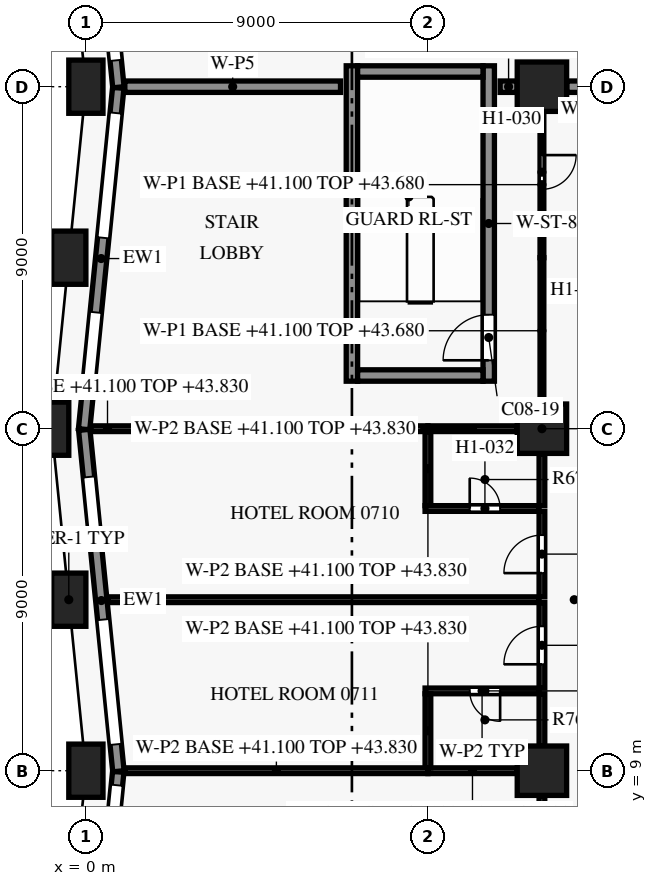
"""IFC4 building model, lengths in metres.
Left out: names, types, materials, properties, quantities, classifications, styles, units other than length and angle.
Written with IfcOpenShell. Run it as: python <this file> out.ifc"""

import sys

from ifc_helpers import new_model, si_unit, direction, frame, frame_2d, origin, origin_2d, place, context, subcontext, project, spatial, rectangle, extrude, element, fill, save


model = new_model("IFC4")
c1 = context("Model", 3, precision=1e-05, world=origin(), true_north=direction((0.0, 1.0)))
c2 = subcontext(c1, "Body", "Model", "MODEL_VIEW")
j1 = project(units=[si_unit("LENGTHUNIT", "METRE"), si_unit("PLANEANGLEUNIT", "RADIAN")], contexts=[c1])
p1 = place(None, origin())
s1 = spatial("IfcSite", under=j1, at=p1, CompositionType="ELEMENT")
p2 = place(p1, origin())
s2 = spatial("IfcBuilding", under=s1, at=p2, CompositionType="ELEMENT")
p3 = place(p2, frame((0.0, 0.0, 41.1)))
s3 = spatial("IfcBuildingStorey", under=s2, at=p3, CompositionType="ELEMENT", Elevation=41.1)
for number, where, z_axis, x_axis in (
    (1, (0.0, 27.0, 0.0), (0.0, 0.0, 1.0), (0.0, -1.0, 0.0)),
    (2, (-0.45, 22.5, 0.0), (0.0, 0.0, 1.0), (-0.1, -0.995, 0.0)),
    (3, (-0.9, 18.0, 0.0), (0.0, 0.0, 1.0), (0.0, -1.0, 0.0)),
    (4, (-0.45, 13.5, 0.0), (0.0, 0.0, 1.0), (0.1, -0.995, 0.0)),
    (5, (0.0, 9.0, 0.0), (0.0, 0.0, 1.0), (0.0, -1.0, 0.0)),
):
    element("IfcColumn", number, at=place(p3, frame(where, z_axis=z_axis, x_axis=x_axis)), inside=s3, PredefinedType="COLUMN", context=c2, shape_type="SweptSolid", body=[
        extrude(rectangle(XDim=0.9, YDim=1.4, at=origin_2d()), origin(), (0.0, 0.0, 1.0), 3.6),
    ])
for number, where, z_axis, x_axis in (
    (6, (12.0, 9.0, 0.0), (0.0, 0.0, 1.0), (1.0, 0.0, 0.0)),
    (7, (12.0, 18.0, 0.0), (0.0, 0.0, 1.0), (1.0, 0.0, 0.0)),
    (8, (12.0, 27.0, 0.0), (0.0, 0.0, 1.0), (1.0, 0.0, 0.0)),
):
    element("IfcColumn", number, at=place(p3, frame(where, z_axis=z_axis, x_axis=x_axis)), inside=s3, PredefinedType="COLUMN", context=c2, shape_type="SweptSolid", body=[
        extrude(rectangle(XDim=1.3, YDim=1.3, at=origin_2d()), origin(), (0.0, 0.0, 1.0), 3.6),
    ])
p4 = place(p3, frame((0.856, 26.985, 0.0), z_axis=(0.0, 0.0, 1.0), x_axis=(-0.099503719021, 0.99503719021, 0.0)))
e9 = element("IfcWall", 9, at=p4, inside=s3, PredefinedType="SOLIDWALL", context=c2, shape_type="SweptSolid", body=[
    extrude(rectangle(XDim=8.995, YDim=0.3, at=frame_2d((4.498, 0.0))), origin(), (0.0, 0.0, 1.0), 2.95),
])
p5 = place(p4, frame((0.711, 0.0, 0.15)))
e10 = element("IfcOpeningElement", 10, at=p5, cuts=e9, PredefinedType="OPENING", context=c2, shape_type="SweptSolid", body=[
    extrude(rectangle(XDim=3.3, YDim=2.4, at=frame_2d((1.65, 1.2))), frame((0.0, 0.16, 0.0), z_axis=(0.0, -1.0, 0.0), x_axis=(1.0, 0.0, 0.0)), (0.0, 0.0, 1.0), 0.32),
])
p6 = place(p4, frame((5.984, 0.0, 0.75)))
e11 = element("IfcOpeningElement", 11, at=p6, cuts=e9, PredefinedType="OPENING", context=c2, shape_type="SweptSolid", body=[
    extrude(rectangle(XDim=1.8, YDim=1.8, at=frame_2d((0.9, 0.9))), frame((0.0, 0.16, 0.0), z_axis=(0.0, -1.0, 0.0), x_axis=(1.0, 0.0, 0.0)), (0.0, 0.0, 1.0), 0.32),
])
p7 = place(p3, frame((-0.047, 17.985, 0.0), z_axis=(0.0, 0.0, 1.0), x_axis=(0.099522457379, 0.995035316196, 0.0)))
e12 = element("IfcWall", 12, at=p7, inside=s3, PredefinedType="SOLIDWALL", context=c2, shape_type="SweptSolid", body=[
    extrude(rectangle(XDim=9.03, YDim=0.3, at=frame_2d((4.515, 0.0))), origin(), (0.0, 0.0, 1.0), 2.95),
])
p8 = place(p7, frame((1.291, 0.0, 0.75)))
e13 = element("IfcOpeningElement", 13, at=p8, cuts=e12, PredefinedType="OPENING", context=c2, shape_type="SweptSolid", body=[
    extrude(rectangle(XDim=1.8, YDim=1.8, at=frame_2d((0.9, 0.9))), frame((0.0, 0.16, 0.0), z_axis=(0.0, -1.0, 0.0), x_axis=(1.0, 0.0, 0.0)), (0.0, 0.0, 1.0), 0.32),
])
p9 = place(p7, frame((5.064, 0.0, 0.15)))
e14 = element("IfcOpeningElement", 14, at=p9, cuts=e12, PredefinedType="OPENING", context=c2, shape_type="SweptSolid", body=[
    extrude(rectangle(XDim=3.3, YDim=2.4, at=frame_2d((1.65, 1.2))), frame((0.0, 0.16, 0.0), z_axis=(0.0, -1.0, 0.0), x_axis=(1.0, 0.0, 0.0)), (0.0, 0.0, 1.0), 0.32),
])
p10 = place(p3, frame((0.856, 8.985, 0.0), z_axis=(0.0, 0.0, 1.0), x_axis=(-0.099495688264, 0.995037993253, 0.0)))
e15 = element("IfcWall", 15, at=p10, inside=s3, PredefinedType="SOLIDWALL", context=c2, shape_type="SweptSolid", body=[
    extrude(rectangle(XDim=9.03, YDim=0.3, at=frame_2d((4.515, 0.0))), origin(), (0.0, 0.0, 1.0), 2.95),
])
p11 = place(p10, frame((0.711, 0.0, 0.15)))
e16 = element("IfcOpeningElement", 16, at=p11, cuts=e15, PredefinedType="OPENING", context=c2, shape_type="SweptSolid", body=[
    extrude(rectangle(XDim=3.3, YDim=2.4, at=frame_2d((1.65, 1.2))), frame((0.0, 0.16, 0.0), z_axis=(0.0, -1.0, 0.0), x_axis=(1.0, 0.0, 0.0)), (0.0, 0.0, 1.0), 0.32),
])
p12 = place(p10, frame((5.984, 0.0, 0.75)))
e17 = element("IfcOpeningElement", 17, at=p12, cuts=e15, PredefinedType="OPENING", context=c2, shape_type="SweptSolid", body=[
    extrude(rectangle(XDim=1.8, YDim=1.8, at=frame_2d((0.9, 0.9))), frame((0.0, 0.16, 0.0), z_axis=(0.0, -1.0, 0.0), x_axis=(1.0, 0.0, 0.0)), (0.0, 0.0, 1.0), 0.32),
])
p13 = place(p3, frame((0.473, 5.185, 0.0), z_axis=(0.0, 0.0, 1.0), x_axis=(0.099541845169, 0.995033376857, 0.0)))
e18 = element("IfcWall", 18, at=p13, inside=s3, PredefinedType="SOLIDWALL", context=c2, shape_type="SweptSolid", body=[
    extrude(rectangle(XDim=3.804, YDim=0.3, at=frame_2d((1.902, 0.0))), origin(), (0.0, 0.0, 1.0), 2.95),
])
p14 = place(p13, frame((0.15, 0.0, 0.15)))
e19 = element("IfcOpeningElement", 19, at=p14, cuts=e18, PredefinedType="OPENING", context=c2, shape_type="SweptSolid", body=[
    extrude(rectangle(XDim=3.3, YDim=2.4, at=frame_2d((1.65, 1.2))), frame((0.0, 0.16, 0.0), z_axis=(0.0, -1.0, 0.0), x_axis=(1.0, 0.0, 0.0)), (0.0, 0.0, 1.0), 0.32),
])
for number, where, z_axis, x_axis in (
    (20, (7.15, 19.4, 0.0), (0.0, 0.0, 1.0), (1.0, 0.0, 0.0)),
    (21, (7.15, 27.4, 0.0), (0.0, 0.0, 1.0), (1.0, 0.0, 0.0)),
):
    element("IfcWall", number, at=place(p3, frame(where, z_axis=z_axis, x_axis=x_axis)), inside=s3, PredefinedType="SHEAR", context=c2, shape_type="SweptSolid", body=[
        extrude(rectangle(XDim=3.3, YDim=0.3, at=frame_2d((1.65, 0.0))), origin(), (0.0, 0.0, 1.0), 3.3),
    ])
p15 = place(p3, frame((7.0, 19.25, 0.0), z_axis=(0.0, 0.0, 1.0), x_axis=(0.0, 1.0, 0.0)))
e22 = element("IfcWall", 22, at=p15, inside=s3, PredefinedType="SHEAR", context=c2, shape_type="SweptSolid", body=[
    extrude(rectangle(XDim=8.3, YDim=0.3, at=frame_2d((4.15, 0.0))), origin(), (0.0, 0.0, 1.0), 3.3),
])
p16 = place(p3, frame((10.6, 19.25, 0.0), z_axis=(0.0, 0.0, 1.0), x_axis=(0.0, 1.0, 0.0)))
e23 = element("IfcWall", 23, at=p16, inside=s3, PredefinedType="SHEAR", context=c2, shape_type="SweptSolid", body=[
    extrude(rectangle(XDim=8.3, YDim=0.3, at=frame_2d((4.15, 0.0))), origin(), (0.0, 0.0, 1.0), 3.3),
])
p17 = place(p16, frame((0.55, 0.0, 0.0)))
e24 = element("IfcOpeningElement", 24, at=p17, cuts=e23, PredefinedType="OPENING", context=c2, shape_type="SweptSolid", body=[
    extrude(rectangle(XDim=1.2, YDim=2.2, at=frame_2d((0.6, 1.1))), frame((0.0, 0.16, 0.0), z_axis=(0.0, -1.0, 0.0), x_axis=(1.0, 0.0, 0.0)), (0.0, 0.0, 1.0), 0.32),
])
p18 = place(p3, frame((12.0, 7.275, 0.0), z_axis=(0.0, 0.0, 1.0), x_axis=(0.0, 1.0, 0.0)))
e25 = element("IfcWall", 25, at=p18, inside=s3, PredefinedType="PARTITIONING", context=c2, shape_type="SweptSolid", body=[
    extrude(rectangle(XDim=1.07, YDim=0.15, at=frame_2d((0.535, 0.0))), origin(), (0.0, 0.0, 1.0), 2.58),
])
p19 = place(p3, frame((9.0, 9.0, 0.0), z_axis=(0.0, 0.0, 1.0), x_axis=(-1.0, 0.0, 0.0)))
e26 = element("IfcWall", 26, at=p19, inside=s3, PredefinedType="PARTITIONING", context=c2, shape_type="SweptSolid", body=[
    extrude(rectangle(XDim=7.975, YDim=0.15, at=frame_2d((3.988, 0.0))), origin(), (0.0, 0.0, 1.0), 2.73),
])
p20 = place(p3, frame((11.345, 9.0, 0.0), z_axis=(0.0, 0.0, 1.0), x_axis=(-1.0, 0.0, 0.0)))
e27 = element("IfcWall", 27, at=p20, inside=s3, PredefinedType="PARTITIONING", context=c2, shape_type="SweptSolid", body=[
    extrude(rectangle(XDim=2.345, YDim=0.15, at=frame_2d((1.172, 0.0))), origin(), (0.0, 0.0, 1.0), 2.73),
])
p21 = place(p3, frame((12.0, 9.655, 0.0), z_axis=(0.0, 0.0, 1.0), x_axis=(0.0, 1.0, 0.0)))
e28 = element("IfcWall", 28, at=p21, inside=s3, PredefinedType="PARTITIONING", context=c2, shape_type="SweptSolid", body=[
    extrude(rectangle(XDim=1.37, YDim=0.15, at=frame_2d((0.685, 0.0))), origin(), (0.0, 0.0, 1.0), 2.58),
])
p22 = place(p3, frame((9.0, 11.025, 0.0), z_axis=(0.0, 0.0, 1.0), x_axis=(0.0, -1.0, 0.0)))
e29 = element("IfcWall", 29, at=p22, inside=s3, PredefinedType="PARTITIONING", context=c2, shape_type="SweptSolid", body=[
    extrude(rectangle(XDim=1.95, YDim=0.15, at=frame_2d((0.975, 0.0))), origin(), (0.0, 0.0, 1.0), 2.73),
])
p23 = place(p3, frame((11.925, 11.1, 0.0), z_axis=(0.0, 0.0, 1.0), x_axis=(-1.0, 0.0, 0.0)))
e30 = element("IfcWall", 30, at=p23, inside=s3, PredefinedType="PARTITIONING", context=c2, shape_type="SweptSolid", body=[
    extrude(rectangle(XDim=3.0, YDim=0.15, at=frame_2d((1.5, 0.0))), origin(), (0.0, 0.0, 1.0), 2.58),
])
p24 = place(p23, frame((1.025, 0.0, 0.0)))
e31 = element("IfcOpeningElement", 31, at=p24, cuts=e30, PredefinedType="OPENING", context=c2, shape_type="SweptSolid", body=[
    extrude(rectangle(XDim=0.8, YDim=2.1, at=frame_2d((0.4, 1.05))), frame((0.0, 0.085, 0.0), z_axis=(0.0, -1.0, 0.0), x_axis=(1.0, 0.0, 0.0)), (0.0, 0.0, 1.0), 0.17),
])
p25 = place(p3, frame((12.0, 11.175, 0.0), z_axis=(0.0, 0.0, 1.0), x_axis=(0.0, 1.0, 0.0)))
e32 = element("IfcWall", 32, at=p25, inside=s3, PredefinedType="PARTITIONING", context=c2, shape_type="SweptSolid", body=[
    extrude(rectangle(XDim=2.25, YDim=0.15, at=frame_2d((1.125, 0.0))), origin(), (0.0, 0.0, 1.0), 2.58),
])
p26 = place(p25, frame((0.625, 0.0, 0.0)))
e33 = element("IfcOpeningElement", 33, at=p26, cuts=e32, PredefinedType="OPENING", context=c2, shape_type="SweptSolid", body=[
    extrude(rectangle(XDim=1.0, YDim=2.1, at=frame_2d((0.5, 1.05))), frame((0.0, 0.085, 0.0), z_axis=(0.0, -1.0, 0.0), x_axis=(1.0, 0.0, 0.0)), (0.0, 0.0, 1.0), 0.17),
])
p27 = place(p3, frame((11.925, 13.5, 0.0), z_axis=(0.0, 0.0, 1.0), x_axis=(-1.0, 0.0, 0.0)))
e34 = element("IfcWall", 34, at=p27, inside=s3, PredefinedType="PARTITIONING", context=c2, shape_type="SweptSolid", body=[
    extrude(rectangle(XDim=11.35, YDim=0.15, at=frame_2d((5.675, 0.0))), origin(), (0.0, 0.0, 1.0), 2.58),
])
p28 = place(p3, frame((12.0, 13.575, 0.0), z_axis=(0.0, 0.0, 1.0), x_axis=(0.0, 1.0, 0.0)))
e35 = element("IfcWall", 35, at=p28, inside=s3, PredefinedType="PARTITIONING", context=c2, shape_type="SweptSolid", body=[
    extrude(rectangle(XDim=2.25, YDim=0.15, at=frame_2d((1.125, 0.0))), origin(), (0.0, 0.0, 1.0), 2.58),
])
p29 = place(p28, frame((0.625, 0.0, 0.0)))
e36 = element("IfcOpeningElement", 36, at=p29, cuts=e35, PredefinedType="OPENING", context=c2, shape_type="SweptSolid", body=[
    extrude(rectangle(XDim=1.0, YDim=2.1, at=frame_2d((0.5, 1.05))), frame((0.0, 0.085, 0.0), z_axis=(0.0, -1.0, 0.0), x_axis=(1.0, 0.0, 0.0)), (0.0, 0.0, 1.0), 0.17),
])
p30 = place(p3, frame((8.925, 15.9, 0.0), z_axis=(0.0, 0.0, 1.0), x_axis=(1.0, 0.0, 0.0)))
e37 = element("IfcWall", 37, at=p30, inside=s3, PredefinedType="PARTITIONING", context=c2, shape_type="SweptSolid", body=[
    extrude(rectangle(XDim=3.0, YDim=0.15, at=frame_2d((1.5, 0.0))), origin(), (0.0, 0.0, 1.0), 2.58),
])
p31 = place(p30, frame((1.175, 0.0, 0.0)))
e38 = element("IfcOpeningElement", 38, at=p31, cuts=e37, PredefinedType="OPENING", context=c2, shape_type="SweptSolid", body=[
    extrude(rectangle(XDim=0.8, YDim=2.1, at=frame_2d((0.4, 1.05))), frame((0.0, 0.085, 0.0), z_axis=(0.0, -1.0, 0.0), x_axis=(1.0, 0.0, 0.0)), (0.0, 0.0, 1.0), 0.17),
])
p32 = place(p3, frame((12.0, 15.975, 0.0), z_axis=(0.0, 0.0, 1.0), x_axis=(0.0, 1.0, 0.0)))
e39 = element("IfcWall", 39, at=p32, inside=s3, PredefinedType="PARTITIONING", context=c2, shape_type="SweptSolid", body=[
    extrude(rectangle(XDim=1.37, YDim=0.15, at=frame_2d((0.685, 0.0))), origin(), (0.0, 0.0, 1.0), 2.58),
])
p33 = place(p3, frame((9.0, 17.925, 0.0), z_axis=(0.0, 0.0, 1.0), x_axis=(0.0, -1.0, 0.0)))
e40 = element("IfcWall", 40, at=p33, inside=s3, PredefinedType="PARTITIONING", context=c2, shape_type="SweptSolid", body=[
    extrude(rectangle(XDim=1.95, YDim=0.15, at=frame_2d((0.975, 0.0))), origin(), (0.0, 0.0, 1.0), 2.73),
])
p34 = place(p3, frame((9.0, 18.0, 0.0), z_axis=(0.0, 0.0, 1.0), x_axis=(-1.0, 0.0, 0.0)))
e41 = element("IfcWall", 41, at=p34, inside=s3, PredefinedType="PARTITIONING", context=c2, shape_type="SweptSolid", body=[
    extrude(rectangle(XDim=8.875, YDim=0.15, at=frame_2d((4.438, 0.0))), origin(), (0.0, 0.0, 1.0), 2.73),
])
p35 = place(p3, frame((11.345, 18.0, 0.0), z_axis=(0.0, 0.0, 1.0), x_axis=(-1.0, 0.0, 0.0)))
e42 = element("IfcWall", 42, at=p35, inside=s3, PredefinedType="PARTITIONING", context=c2, shape_type="SweptSolid", body=[
    extrude(rectangle(XDim=2.345, YDim=0.15, at=frame_2d((1.172, 0.0))), origin(), (0.0, 0.0, 1.0), 2.73),
])
p36 = place(p3, frame((12.0, 22.5, 0.0), z_axis=(0.0, 0.0, 1.0), x_axis=(0.0, -1.0, 0.0)))
e43 = element("IfcWall", 43, at=p36, inside=s3, PredefinedType="PARTITIONING", context=c2, shape_type="SweptSolid", body=[
    extrude(rectangle(XDim=3.845, YDim=0.1, at=frame_2d((1.922, 0.0))), origin(), (0.0, 0.0, 1.0), 2.58),
])
p37 = place(p3, frame((12.0, 26.345, 0.0), z_axis=(0.0, 0.0, 1.0), x_axis=(0.0, -1.0, 0.0)))
e44 = element("IfcWall", 44, at=p37, inside=s3, PredefinedType="PARTITIONING", context=c2, shape_type="SweptSolid", body=[
    extrude(rectangle(XDim=3.845, YDim=0.1, at=frame_2d((1.922, 0.0))), origin(), (0.0, 0.0, 1.0), 2.58),
])
p38 = place(p37, frame((1.145, 0.0, 0.0)))
e45 = element("IfcOpeningElement", 45, at=p38, cuts=e44, PredefinedType="OPENING", context=c2, shape_type="SweptSolid", body=[
    extrude(rectangle(XDim=0.9, YDim=2.1, at=frame_2d((0.45, 1.05))), frame((0.0, 0.06, 0.0), z_axis=(0.0, -1.0, 0.0), x_axis=(1.0, 0.0, 0.0)), (0.0, 0.0, 1.0), 0.12),
])
p39 = place(p3, frame((6.7, 27.0, 0.0), z_axis=(0.0, 0.0, 1.0), x_axis=(-1.0, 0.0, 0.0)))
e46 = element("IfcWall", 46, at=p39, inside=s3, PredefinedType="PARTITIONING", context=c2, shape_type="SweptSolid", body=[
    extrude(rectangle(XDim=5.675, YDim=0.3, at=frame_2d((2.837, 0.0))), origin(), (0.0, 0.0, 1.0), 2.58),
])
p40 = place(p3, frame((11.345, 27.0, 0.0), z_axis=(0.0, 0.0, 1.0), x_axis=(-1.0, 0.0, 0.0)))
e47 = element("IfcWall", 47, at=p40, inside=s3, PredefinedType="PARTITIONING", context=c2, shape_type="SweptSolid", body=[
    extrude(rectangle(XDim=0.445, YDim=0.3, at=frame_2d((0.223, 0.0))), origin(), (0.0, 0.0, 1.0), 3.28),
])
p41 = place(p3, frame((13.5, 27.0, 0.0), z_axis=(0.0, 0.0, 1.0), x_axis=(-1.0, 0.0, 0.0)))
e48 = element("IfcWall", 48, at=p41, inside=s3, PredefinedType="PARTITIONING", context=c2, shape_type="SweptSolid", body=[
    extrude(rectangle(XDim=0.845, YDim=0.3, at=frame_2d((0.422, 0.0))), origin(), (0.0, 0.0, 1.0), 2.58),
])
p42 = place(p5, origin())
e49 = element("IfcWindow", 49, at=p42, inside=s3, PartitioningType="SINGLE_PANEL", PredefinedType="WINDOW", context=c2, shape_type="SweptSolid", body=[
    extrude(rectangle(XDim=3.3, YDim=2.4, at=frame_2d((1.65, 1.2))), frame((0.0, 0.03, 0.0), z_axis=(0.0, -1.0, 0.0), x_axis=(1.0, 0.0, 0.0)), (0.0, 0.0, 1.0), 0.06),
])
fill(e10, e49)
p43 = place(p8, origin())
e50 = element("IfcWindow", 50, at=p43, inside=s3, PartitioningType="SINGLE_PANEL", PredefinedType="WINDOW", context=c2, shape_type="SweptSolid", body=[
    extrude(rectangle(XDim=1.8, YDim=1.8, at=frame_2d((0.9, 0.9))), frame((0.0, 0.03, 0.0), z_axis=(0.0, -1.0, 0.0), x_axis=(1.0, 0.0, 0.0)), (0.0, 0.0, 1.0), 0.06),
])
fill(e13, e50)
p44 = place(p9, origin())
e51 = element("IfcWindow", 51, at=p44, inside=s3, PartitioningType="SINGLE_PANEL", PredefinedType="WINDOW", context=c2, shape_type="SweptSolid", body=[
    extrude(rectangle(XDim=3.3, YDim=2.4, at=frame_2d((1.65, 1.2))), frame((0.0, 0.03, 0.0), z_axis=(0.0, -1.0, 0.0), x_axis=(1.0, 0.0, 0.0)), (0.0, 0.0, 1.0), 0.06),
])
fill(e14, e51)
p45 = place(p11, origin())
e52 = element("IfcWindow", 52, at=p45, inside=s3, PartitioningType="SINGLE_PANEL", PredefinedType="WINDOW", context=c2, shape_type="SweptSolid", body=[
    extrude(rectangle(XDim=3.3, YDim=2.4, at=frame_2d((1.65, 1.2))), frame((0.0, 0.03, 0.0), z_axis=(0.0, -1.0, 0.0), x_axis=(1.0, 0.0, 0.0)), (0.0, 0.0, 1.0), 0.06),
])
fill(e16, e52)
p46 = place(p12, origin())
e53 = element("IfcWindow", 53, at=p46, inside=s3, PartitioningType="SINGLE_PANEL", PredefinedType="WINDOW", context=c2, shape_type="SweptSolid", body=[
    extrude(rectangle(XDim=1.8, YDim=1.8, at=frame_2d((0.9, 0.9))), frame((0.0, 0.03, 0.0), z_axis=(0.0, -1.0, 0.0), x_axis=(1.0, 0.0, 0.0)), (0.0, 0.0, 1.0), 0.06),
])
fill(e17, e53)
p47 = place(p14, origin())
e54 = element("IfcWindow", 54, at=p47, inside=s3, PartitioningType="SINGLE_PANEL", PredefinedType="WINDOW", context=c2, shape_type="SweptSolid", body=[
    extrude(rectangle(XDim=3.3, YDim=2.4, at=frame_2d((1.65, 1.2))), frame((0.0, 0.03, 0.0), z_axis=(0.0, -1.0, 0.0), x_axis=(1.0, 0.0, 0.0)), (0.0, 0.0, 1.0), 0.06),
])
fill(e19, e54)
p48 = place(p17, origin())
e55 = element("IfcDoor", 55, at=p48, inside=s3, OperationType="SINGLE_SWING_RIGHT", PredefinedType="DOOR", context=c2, shape_type="SweptSolid", body=[
    extrude(rectangle(XDim=1.2, YDim=2.2, at=frame_2d((0.6, 1.1))), frame((0.0, 0.025, 0.0), z_axis=(0.0, -1.0, 0.0), x_axis=(1.0, 0.0, 0.0)), (0.0, 0.0, 1.0), 0.05),
])
fill(e24, e55)
p49 = place(p38, origin())
e56 = element("IfcDoor", 56, at=p49, inside=s3, OperationType="SINGLE_SWING_LEFT", PredefinedType="DOOR", context=c2, shape_type="SweptSolid", body=[
    extrude(rectangle(XDim=0.9, YDim=2.1, at=frame_2d((0.45, 1.05))), frame((0.0, 0.025, 0.0), z_axis=(0.0, -1.0, 0.0), x_axis=(1.0, 0.0, 0.0)), (0.0, 0.0, 1.0), 0.05),
])
fill(e45, e56)
p50 = place(p29, origin())
e57 = element("IfcDoor", 57, at=p50, inside=s3, OperationType="SINGLE_SWING_LEFT", PredefinedType="DOOR", context=c2, shape_type="SweptSolid", body=[
    extrude(rectangle(XDim=1.0, YDim=2.1, at=frame_2d((0.5, 1.05))), frame((0.0, 0.025, 0.0), z_axis=(0.0, -1.0, 0.0), x_axis=(1.0, 0.0, 0.0)), (0.0, 0.0, 1.0), 0.05),
])
fill(e36, e57)
p51 = place(p31, origin())
e58 = element("IfcDoor", 58, at=p51, inside=s3, OperationType="SINGLE_SWING_LEFT", PredefinedType="DOOR", context=c2, shape_type="SweptSolid", body=[
    extrude(rectangle(XDim=0.8, YDim=2.1, at=frame_2d((0.4, 1.05))), frame((0.0, 0.025, 0.0), z_axis=(0.0, -1.0, 0.0), x_axis=(1.0, 0.0, 0.0)), (0.0, 0.0, 1.0), 0.05),
])
fill(e38, e58)
p52 = place(p26, origin())
e59 = element("IfcDoor", 59, at=p52, inside=s3, OperationType="SINGLE_SWING_LEFT", PredefinedType="DOOR", context=c2, shape_type="SweptSolid", body=[
    extrude(rectangle(XDim=1.0, YDim=2.1, at=frame_2d((0.5, 1.05))), frame((0.0, 0.025, 0.0), z_axis=(0.0, -1.0, 0.0), x_axis=(1.0, 0.0, 0.0)), (0.0, 0.0, 1.0), 0.05),
])
fill(e33, e59)
p53 = place(p24, origin())
e60 = element("IfcDoor", 60, at=p53, inside=s3, OperationType="SINGLE_SWING_LEFT", PredefinedType="DOOR", context=c2, shape_type="SweptSolid", body=[
    extrude(rectangle(XDim=0.8, YDim=2.1, at=frame_2d((0.4, 1.05))), frame((0.0, 0.025, 0.0), z_axis=(0.0, -1.0, 0.0), x_axis=(1.0, 0.0, 0.0)), (0.0, 0.0, 1.0), 0.05),
])
fill(e31, e60)
save(model, sys.argv[1])
